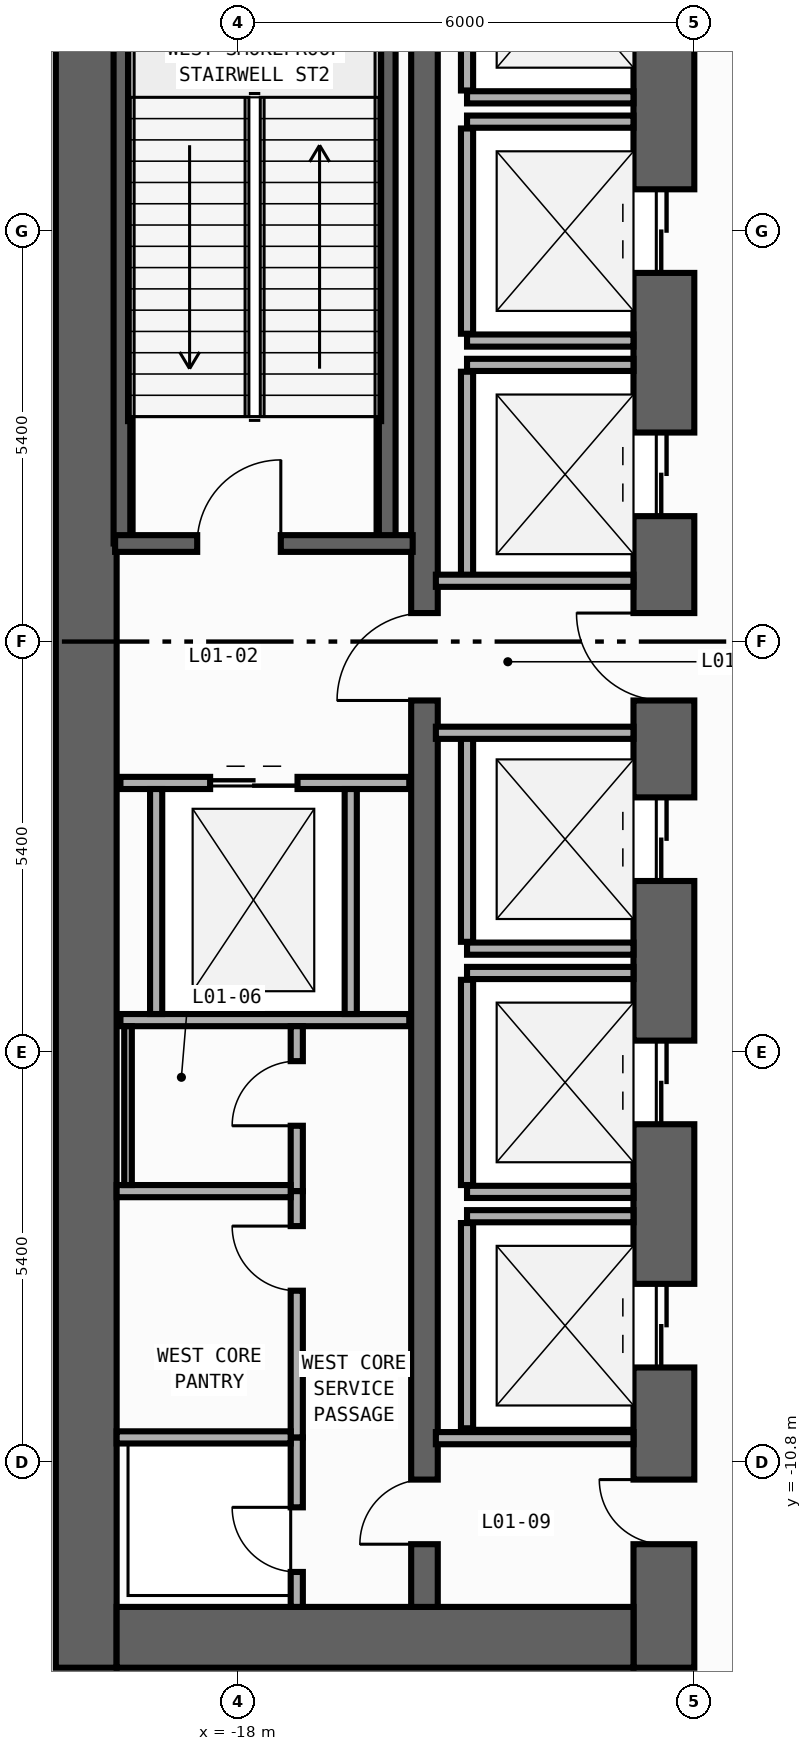
"""IFC4 building model, lengths in metres.
Left out: names, types, materials, properties, quantities, classifications, styles, units other than length and angle.
Written with IfcOpenShell. Run it as: python <this file> out.ifc"""

import sys

from ifc_helpers import new_model, si_unit, direction, frame, frame_2d, origin, place, context, subcontext, project, spatial, rectangle, extrude, element, fill, save


model = new_model("IFC4")
c1 = context("Model", 3, precision=1e-05, world=origin(), true_north=direction((0.0, 1.0)))
c2 = subcontext(c1, "Body", "Model", "MODEL_VIEW")
j1 = project(units=[si_unit("LENGTHUNIT", "METRE"), si_unit("PLANEANGLEUNIT", "RADIAN")], contexts=[c1])
p1 = place(None, origin())
s1 = spatial("IfcSite", under=j1, at=p1, CompositionType="ELEMENT")
p2 = place(p1, origin())
s2 = spatial("IfcBuilding", under=s1, at=p2, CompositionType="ELEMENT")
p3 = place(p2, origin())
s3 = spatial("IfcBuildingStorey", under=s2, at=p3, CompositionType="ELEMENT", Elevation=0.0)
p4 = place(p3, frame((-20.0, -13.5, 0.0), z_axis=(0.0, 0.0, 1.0), x_axis=(0.0, 1.0, 0.0)))
e1 = element("IfcWall", 1, at=p4, inside=s3, PredefinedType="SHEAR", context=c2, shape_type="SweptSolid", body=[
    extrude(rectangle(XDim=27.0, YDim=0.8, at=frame_2d((13.5, 0.0))), origin(), (0.0, 0.0, 1.0), 5.7),
])
p5 = place(p3, frame((-12.4, -13.5, 0.0), z_axis=(0.0, 0.0, 1.0), x_axis=(0.0, 1.0, 0.0)))
e2 = element("IfcWall", 2, at=p5, inside=s3, PredefinedType="SHEAR", context=c2, shape_type="SweptSolid", body=[
    extrude(rectangle(XDim=27.0, YDim=0.8, at=frame_2d((13.5, 0.0))), origin(), (0.0, 0.0, 1.0), 5.7),
])
p6 = place(p5, frame((21.55, 0.0, 0.0)))
e3 = element("IfcOpeningElement", 3, at=p6, cuts=e2, PredefinedType="OPENING", context=c2, shape_type="SweptSolid", body=[
    extrude(rectangle(XDim=1.1, YDim=2.2, at=frame_2d((0.55, 1.1))), frame((0.0, 0.41, 0.0), z_axis=(0.0, -1.0, 0.0), x_axis=(1.0, 0.0, 0.0)), (0.0, 0.0, 1.0), 0.82),
])
p7 = place(p5, frame((18.35, 0.0, 0.0)))
e4 = element("IfcOpeningElement", 4, at=p7, cuts=e2, PredefinedType="OPENING", context=c2, shape_type="SweptSolid", body=[
    extrude(rectangle(XDim=1.1, YDim=2.2, at=frame_2d((0.55, 1.1))), frame((0.0, 0.41, 0.0), z_axis=(0.0, -1.0, 0.0), x_axis=(1.0, 0.0, 0.0)), (0.0, 0.0, 1.0), 0.82),
])
p8 = place(p5, frame((15.15, 0.0, 0.0)))
e5 = element("IfcOpeningElement", 5, at=p8, cuts=e2, PredefinedType="OPENING", context=c2, shape_type="SweptSolid", body=[
    extrude(rectangle(XDim=1.1, YDim=2.2, at=frame_2d((0.55, 1.1))), frame((0.0, 0.41, 0.0), z_axis=(0.0, -1.0, 0.0), x_axis=(1.0, 0.0, 0.0)), (0.0, 0.0, 1.0), 0.82),
])
p9 = place(p5, frame((10.35, 0.0, 0.0)))
e6 = element("IfcOpeningElement", 6, at=p9, cuts=e2, PredefinedType="OPENING", context=c2, shape_type="SweptSolid", body=[
    extrude(rectangle(XDim=1.1, YDim=2.2, at=frame_2d((0.55, 1.1))), frame((0.0, 0.41, 0.0), z_axis=(0.0, -1.0, 0.0), x_axis=(1.0, 0.0, 0.0)), (0.0, 0.0, 1.0), 0.82),
])
p10 = place(p5, frame((7.15, 0.0, 0.0)))
e7 = element("IfcOpeningElement", 7, at=p10, cuts=e2, PredefinedType="OPENING", context=c2, shape_type="SweptSolid", body=[
    extrude(rectangle(XDim=1.1, YDim=2.2, at=frame_2d((0.55, 1.1))), frame((0.0, 0.41, 0.0), z_axis=(0.0, -1.0, 0.0), x_axis=(1.0, 0.0, 0.0)), (0.0, 0.0, 1.0), 0.82),
])
p11 = place(p5, frame((3.95, 0.0, 0.0)))
e8 = element("IfcOpeningElement", 8, at=p11, cuts=e2, PredefinedType="OPENING", context=c2, shape_type="SweptSolid", body=[
    extrude(rectangle(XDim=1.1, YDim=2.2, at=frame_2d((0.55, 1.1))), frame((0.0, 0.41, 0.0), z_axis=(0.0, -1.0, 0.0), x_axis=(1.0, 0.0, 0.0)), (0.0, 0.0, 1.0), 0.82),
])
p12 = place(p5, frame((12.725, 0.0, 0.0)))
e9 = element("IfcOpeningElement", 9, at=p12, cuts=e2, PredefinedType="OPENING", context=c2, shape_type="SweptSolid", body=[
    extrude(rectangle(XDim=1.15, YDim=2.2, at=frame_2d((0.575, 1.1))), frame((0.0, 0.41, 0.0), z_axis=(0.0, -1.0, 0.0), x_axis=(1.0, 0.0, 0.0)), (0.0, 0.0, 1.0), 0.82),
])
p13 = place(p5, frame((1.625, 0.0, 0.0)))
e10 = element("IfcOpeningElement", 10, at=p13, cuts=e2, PredefinedType="OPENING", context=c2, shape_type="SweptSolid", body=[
    extrude(rectangle(XDim=0.85, YDim=2.1, at=frame_2d((0.425, 1.05))), frame((0.0, 0.41, 0.0), z_axis=(0.0, -1.0, 0.0), x_axis=(1.0, 0.0, 0.0)), (0.0, 0.0, 1.0), 0.82),
])
p14 = place(p3, frame((-19.6, -13.1, 0.0), z_axis=(0.0, 0.0, 1.0), x_axis=(1.0, 0.0, 0.0)))
e11 = element("IfcWall", 11, at=p14, inside=s3, PredefinedType="SHEAR", context=c2, shape_type="SweptSolid", body=[
    extrude(rectangle(XDim=6.8, YDim=0.8, at=frame_2d((3.4, 0.0))), origin(), (0.0, 0.0, 1.0), 5.7),
])
p15 = place(p3, frame((-15.55, -12.7, 0.0), z_axis=(0.0, 0.0, 1.0), x_axis=(0.0, 1.0, 0.0)))
e12 = element("IfcWall", 12, at=p15, inside=s3, PredefinedType="SHEAR", context=c2, shape_type="SweptSolid", body=[
    extrude(rectangle(XDim=25.4, YDim=0.35, at=frame_2d((12.7, 0.0))), origin(), (0.0, 0.0, 1.0), 5.7),
])
p16 = place(p15, frame((11.925, 0.0, 0.0)))
e13 = element("IfcOpeningElement", 13, at=p16, cuts=e12, PredefinedType="OPENING", context=c2, shape_type="SweptSolid", body=[
    extrude(rectangle(XDim=1.15, YDim=2.2, at=frame_2d((0.575, 1.1))), frame((0.0, 0.185, 0.0), z_axis=(0.0, -1.0, 0.0), x_axis=(1.0, 0.0, 0.0)), (0.0, 0.0, 1.0), 0.37),
])
p17 = place(p15, frame((0.825, 0.0, 0.0)))
e14 = element("IfcOpeningElement", 14, at=p17, cuts=e12, PredefinedType="OPENING", context=c2, shape_type="SweptSolid", body=[
    extrude(rectangle(XDim=0.85, YDim=2.1, at=frame_2d((0.425, 1.05))), frame((0.0, 0.185, 0.0), z_axis=(0.0, -1.0, 0.0), x_axis=(1.0, 0.0, 0.0)), (0.0, 0.0, 1.0), 0.37),
])
for number, where, z_axis, x_axis in (
    (15, (-16.04, 1.29, 0.0), (0.0, 0.0, 1.0), (0.0, 1.0, 0.0)),
    (16, (-19.53, 1.29, 0.0), (0.0, 0.0, 1.0), (0.0, 1.0, 0.0)),
):
    element("IfcWall", number, at=place(p3, frame(where, z_axis=z_axis, x_axis=x_axis)), inside=s3, PredefinedType="SHEAR", context=c2, shape_type="SweptSolid", body=[
        extrude(rectangle(XDim=11.3, YDim=0.22, at=frame_2d((5.65, 0.0))), origin(), (0.0, 0.0, 1.0), 5.7),
    ])
p18 = place(p3, frame((-19.62, 1.29, 0.0), z_axis=(0.0, 0.0, 1.0), x_axis=(1.0, 0.0, 0.0)))
e17 = element("IfcWall", 17, at=p18, inside=s3, PredefinedType="SHEAR", context=c2, shape_type="SweptSolid", body=[
    extrude(rectangle(XDim=3.915, YDim=0.22, at=frame_2d((1.958, 0.0))), origin(), (0.0, 0.0, 1.0), 5.7),
])
p19 = place(p18, frame((1.08, 0.0, 0.0)))
e18 = element("IfcOpeningElement", 18, at=p19, cuts=e17, PredefinedType="OPENING", context=c2, shape_type="SweptSolid", body=[
    extrude(rectangle(XDim=1.1, YDim=2.2, at=frame_2d((0.55, 1.1))), frame((0.0, 0.12, 0.0), z_axis=(0.0, -1.0, 0.0), x_axis=(1.0, 0.0, 0.0)), (0.0, 0.0, 1.0), 0.24),
])
p20 = place(p3, frame((-14.99, 7.16, 0.0), z_axis=(0.0, 0.0, 1.0), x_axis=(1.0, 0.0, 0.0)))
e19 = element("IfcWall", 19, at=p20, inside=s3, PredefinedType="STANDARD", context=c2, shape_type="SweptSolid", body=[
    extrude(rectangle(XDim=2.19, YDim=0.16, at=frame_2d((1.095, 0.0))), origin(), (0.0, 0.0, 1.0), 5.7),
])
p21 = place(p3, frame((-14.99, 7.25, 0.0), z_axis=(0.0, 0.0, 1.0), x_axis=(0.0, 1.0, 0.0)))
e20 = element("IfcWall", 20, at=p21, inside=s3, PredefinedType="STANDARD", context=c2, shape_type="SweptSolid", body=[
    extrude(rectangle(XDim=2.7, YDim=0.16, at=frame_2d((1.35, 0.0))), origin(), (0.0, 0.0, 1.0), 5.7),
])
for number, where, z_axis, x_axis in (
    (21, (-14.99, 3.96, 0.0), (0.0, 0.0, 1.0), (1.0, 0.0, 0.0)),
    (22, (-14.99, 6.84, 0.0), (0.0, 0.0, 1.0), (1.0, 0.0, 0.0)),
):
    element("IfcWall", number, at=place(p3, frame(where, z_axis=z_axis, x_axis=x_axis)), inside=s3, PredefinedType="STANDARD", context=c2, shape_type="SweptSolid", body=[
        extrude(rectangle(XDim=2.19, YDim=0.16, at=frame_2d((1.095, 0.0))), origin(), (0.0, 0.0, 1.0), 5.7),
    ])
p22 = place(p3, frame((-14.99, 4.05, 0.0), z_axis=(0.0, 0.0, 1.0), x_axis=(0.0, 1.0, 0.0)))
e23 = element("IfcWall", 23, at=p22, inside=s3, PredefinedType="STANDARD", context=c2, shape_type="SweptSolid", body=[
    extrude(rectangle(XDim=2.7, YDim=0.16, at=frame_2d((1.35, 0.0))), origin(), (0.0, 0.0, 1.0), 5.7),
])
p23 = place(p3, frame((-14.99, 3.64, 0.0), z_axis=(0.0, 0.0, 1.0), x_axis=(1.0, 0.0, 0.0)))
e24 = element("IfcWall", 24, at=p23, inside=s3, PredefinedType="STANDARD", context=c2, shape_type="SweptSolid", body=[
    extrude(rectangle(XDim=2.19, YDim=0.16, at=frame_2d((1.095, 0.0))), origin(), (0.0, 0.0, 1.0), 5.7),
])
p24 = place(p3, frame((-14.99, 0.85, 0.0), z_axis=(0.0, 0.0, 1.0), x_axis=(0.0, 1.0, 0.0)))
e25 = element("IfcWall", 25, at=p24, inside=s3, PredefinedType="STANDARD", context=c2, shape_type="SweptSolid", body=[
    extrude(rectangle(XDim=2.7, YDim=0.16, at=frame_2d((1.35, 0.0))), origin(), (0.0, 0.0, 1.0), 5.7),
])
p25 = place(p3, frame((-14.99, -4.04, 0.0), z_axis=(0.0, 0.0, 1.0), x_axis=(1.0, 0.0, 0.0)))
e26 = element("IfcWall", 26, at=p25, inside=s3, PredefinedType="STANDARD", context=c2, shape_type="SweptSolid", body=[
    extrude(rectangle(XDim=2.19, YDim=0.16, at=frame_2d((1.095, 0.0))), origin(), (0.0, 0.0, 1.0), 5.7),
])
p26 = place(p3, frame((-14.99, -3.95, 0.0), z_axis=(0.0, 0.0, 1.0), x_axis=(0.0, 1.0, 0.0)))
e27 = element("IfcWall", 27, at=p26, inside=s3, PredefinedType="STANDARD", context=c2, shape_type="SweptSolid", body=[
    extrude(rectangle(XDim=2.7, YDim=0.16, at=frame_2d((1.35, 0.0))), origin(), (0.0, 0.0, 1.0), 5.7),
])
for number, where, z_axis, x_axis in (
    (28, (-14.99, -7.24, 0.0), (0.0, 0.0, 1.0), (1.0, 0.0, 0.0)),
    (29, (-14.99, -4.36, 0.0), (0.0, 0.0, 1.0), (1.0, 0.0, 0.0)),
):
    element("IfcWall", number, at=place(p3, frame(where, z_axis=z_axis, x_axis=x_axis)), inside=s3, PredefinedType="STANDARD", context=c2, shape_type="SweptSolid", body=[
        extrude(rectangle(XDim=2.19, YDim=0.16, at=frame_2d((1.095, 0.0))), origin(), (0.0, 0.0, 1.0), 5.7),
    ])
p27 = place(p3, frame((-14.99, -7.15, 0.0), z_axis=(0.0, 0.0, 1.0), x_axis=(0.0, 1.0, 0.0)))
e30 = element("IfcWall", 30, at=p27, inside=s3, PredefinedType="STANDARD", context=c2, shape_type="SweptSolid", body=[
    extrude(rectangle(XDim=2.7, YDim=0.16, at=frame_2d((1.35, 0.0))), origin(), (0.0, 0.0, 1.0), 5.7),
])
p28 = place(p3, frame((-14.99, -7.56, 0.0), z_axis=(0.0, 0.0, 1.0), x_axis=(1.0, 0.0, 0.0)))
e31 = element("IfcWall", 31, at=p28, inside=s3, PredefinedType="STANDARD", context=c2, shape_type="SweptSolid", body=[
    extrude(rectangle(XDim=2.19, YDim=0.16, at=frame_2d((1.095, 0.0))), origin(), (0.0, 0.0, 1.0), 5.7),
])
p29 = place(p3, frame((-14.99, -10.35, 0.0), z_axis=(0.0, 0.0, 1.0), x_axis=(0.0, 1.0, 0.0)))
e32 = element("IfcWall", 32, at=p29, inside=s3, PredefinedType="STANDARD", context=c2, shape_type="SweptSolid", body=[
    extrude(rectangle(XDim=2.7, YDim=0.16, at=frame_2d((1.35, 0.0))), origin(), (0.0, 0.0, 1.0), 5.7),
])
p30 = place(p3, frame((-19.55, -1.86, 0.0), z_axis=(0.0, 0.0, 1.0), x_axis=(1.0, 0.0, 0.0)))
e33 = element("IfcWall", 33, at=p30, inside=s3, PredefinedType="STANDARD", context=c2, shape_type="SweptSolid", body=[
    extrude(rectangle(XDim=3.8, YDim=0.16, at=frame_2d((1.9, 0.0))), origin(), (0.0, 0.0, 1.0), 5.7),
])
p31 = place(p30, frame((1.18, 0.0, 0.0)))
e34 = element("IfcOpeningElement", 34, at=p31, cuts=e33, PredefinedType="OPENING", context=c2, shape_type="SweptSolid", body=[
    extrude(rectangle(XDim=1.15, YDim=2.2, at=frame_2d((0.575, 1.1))), frame((0.0, 0.09, 0.0), z_axis=(0.0, -1.0, 0.0), x_axis=(1.0, 0.0, 0.0)), (0.0, 0.0, 1.0), 0.18),
])
p32 = place(p3, frame((-19.55, -4.98, 0.0), z_axis=(0.0, 0.0, 1.0), x_axis=(1.0, 0.0, 0.0)))
e35 = element("IfcWall", 35, at=p32, inside=s3, PredefinedType="STANDARD", context=c2, shape_type="SweptSolid", body=[
    extrude(rectangle(XDim=3.8, YDim=0.16, at=frame_2d((1.9, 0.0))), origin(), (0.0, 0.0, 1.0), 5.7),
])
for number, where, z_axis, x_axis in (
    (36, (-19.08, -4.9, 0.0), (0.0, 0.0, 1.0), (0.0, 1.0, 0.0)),
    (37, (-16.52, -4.9, 0.0), (0.0, 0.0, 1.0), (0.0, 1.0, 0.0)),
):
    element("IfcWall", number, at=place(p3, frame(where, z_axis=z_axis, x_axis=x_axis)), inside=s3, PredefinedType="STANDARD", context=c2, shape_type="SweptSolid", body=[
        extrude(rectangle(XDim=2.96, YDim=0.16, at=frame_2d((1.48, 0.0))), origin(), (0.0, 0.0, 1.0), 5.7),
    ])
for number, where, z_axis, x_axis in (
    (38, (-15.4, 0.8, 0.0), (0.0, 0.0, 1.0), (1.0, 0.0, 0.0)),
    (39, (-15.4, -1.2, 0.0), (0.0, 0.0, 1.0), (1.0, 0.0, 0.0)),
    (40, (-15.4, -10.48, 0.0), (0.0, 0.0, 1.0), (1.0, 0.0, 0.0)),
):
    element("IfcWall", number, at=place(p3, frame(where, z_axis=z_axis, x_axis=x_axis)), inside=s3, PredefinedType="STANDARD", context=c2, shape_type="SweptSolid", body=[
        extrude(rectangle(XDim=2.6, YDim=0.16, at=frame_2d((1.3, 0.0))), origin(), (0.0, 0.0, 1.0), 5.7),
    ])
p33 = place(p3, frame((-17.23, -12.7, 0.0), z_axis=(0.0, 0.0, 1.0), x_axis=(0.0, 1.0, 0.0)))
e41 = element("IfcWall", 41, at=p33, inside=s3, PredefinedType="PARTITIONING", context=c2, shape_type="SweptSolid", body=[
    extrude(rectangle(XDim=2.23, YDim=0.16, at=frame_2d((1.115, 0.0))), origin(), (0.0, 0.0, 1.0), 5.7),
])
p34 = place(p33, frame((0.46, 0.0, 0.0)))
e42 = element("IfcOpeningElement", 42, at=p34, cuts=e41, PredefinedType="OPENING", context=c2, shape_type="SweptSolid", body=[
    extrude(rectangle(XDim=0.85, YDim=2.1, at=frame_2d((0.425, 1.05))), frame((0.0, 0.09, 0.0), z_axis=(0.0, -1.0, 0.0), x_axis=(1.0, 0.0, 0.0)), (0.0, 0.0, 1.0), 0.18),
])
p35 = place(p3, frame((-17.23, -7.23, 0.0), z_axis=(0.0, 0.0, 1.0), x_axis=(0.0, 1.0, 0.0)))
e43 = element("IfcWall", 43, at=p35, inside=s3, PredefinedType="PARTITIONING", context=c2, shape_type="SweptSolid", body=[
    extrude(rectangle(XDim=2.17, YDim=0.16, at=frame_2d((1.085, 0.0))), origin(), (0.0, 0.0, 1.0), 5.7),
])
p36 = place(p35, frame((0.86, 0.0, 0.0)))
e44 = element("IfcOpeningElement", 44, at=p36, cuts=e43, PredefinedType="OPENING", context=c2, shape_type="SweptSolid", body=[
    extrude(rectangle(XDim=0.85, YDim=2.1, at=frame_2d((0.425, 1.05))), frame((0.0, 0.09, 0.0), z_axis=(0.0, -1.0, 0.0), x_axis=(1.0, 0.0, 0.0)), (0.0, 0.0, 1.0), 0.18),
])
p37 = place(p3, frame((-17.23, -10.47, 0.0), z_axis=(0.0, 0.0, 1.0), x_axis=(0.0, 1.0, 0.0)))
e45 = element("IfcWall", 45, at=p37, inside=s3, PredefinedType="PARTITIONING", context=c2, shape_type="SweptSolid", body=[
    extrude(rectangle(XDim=3.24, YDim=0.16, at=frame_2d((1.62, 0.0))), origin(), (0.0, 0.0, 1.0), 5.7),
])
p38 = place(p37, frame((1.93, 0.0, 0.0)))
e46 = element("IfcOpeningElement", 46, at=p38, cuts=e45, PredefinedType="OPENING", context=c2, shape_type="SweptSolid", body=[
    extrude(rectangle(XDim=0.85, YDim=2.1, at=frame_2d((0.425, 1.05))), frame((0.0, 0.09, 0.0), z_axis=(0.0, -1.0, 0.0), x_axis=(1.0, 0.0, 0.0)), (0.0, 0.0, 1.0), 0.18),
])
for number, where, z_axis, x_axis in (
    (47, (-19.6, -10.47, 0.0), (0.0, 0.0, 1.0), (1.0, 0.0, 0.0)),
    (48, (-19.6, -7.23, 0.0), (0.0, 0.0, 1.0), (1.0, 0.0, 0.0)),
):
    element("IfcWall", number, at=place(p3, frame(where, z_axis=z_axis, x_axis=x_axis)), inside=s3, PredefinedType="PARTITIONING", context=c2, shape_type="SweptSolid", body=[
        extrude(rectangle(XDim=2.29, YDim=0.16, at=frame_2d((1.145, 0.0))), origin(), (0.0, 0.0, 1.0), 5.7),
    ])
p39 = place(p3, frame((-19.45, -7.15, 0.0), z_axis=(0.0, 0.0, 1.0), x_axis=(0.0, 1.0, 0.0)))
e49 = element("IfcWall", 49, at=p39, inside=s3, PredefinedType="PARTITIONING", context=c2, shape_type="SweptSolid", body=[
    extrude(rectangle(XDim=2.09, YDim=0.1, at=frame_2d((1.045, 0.0))), origin(), (0.0, 0.0, 1.0), 5.7),
])
p40 = place(p19, origin())
e50 = element("IfcDoor", 50, at=p40, inside=s3, OperationType="SINGLE_SWING_RIGHT", PredefinedType="DOOR", context=c2, shape_type="SweptSolid", body=[
    extrude(rectangle(XDim=1.1, YDim=2.2, at=frame_2d((0.55, 1.1))), frame((0.0, 0.025, 0.0), z_axis=(0.0, -1.0, 0.0), x_axis=(1.0, 0.0, 0.0)), (0.0, 0.0, 1.0), 0.05),
])
fill(e18, e50)
p41 = place(p7, origin())
e51 = element("IfcDoor", 51, at=p41, inside=s3, OperationType="DOUBLE_DOOR_SLIDING", PredefinedType="DOOR", context=c2, shape_type="SweptSolid", body=[
    extrude(rectangle(XDim=1.1, YDim=2.2, at=frame_2d((0.55, 1.1))), frame((0.0, 0.025, 0.0), z_axis=(0.0, -1.0, 0.0), x_axis=(1.0, 0.0, 0.0)), (0.0, 0.0, 1.0), 0.05),
])
fill(e4, e51)
p42 = place(p8, origin())
e52 = element("IfcDoor", 52, at=p42, inside=s3, OperationType="DOUBLE_DOOR_SLIDING", PredefinedType="DOOR", context=c2, shape_type="SweptSolid", body=[
    extrude(rectangle(XDim=1.1, YDim=2.2, at=frame_2d((0.55, 1.1))), frame((0.0, 0.025, 0.0), z_axis=(0.0, -1.0, 0.0), x_axis=(1.0, 0.0, 0.0)), (0.0, 0.0, 1.0), 0.05),
])
fill(e5, e52)
p43 = place(p9, origin())
e53 = element("IfcDoor", 53, at=p43, inside=s3, OperationType="DOUBLE_DOOR_SLIDING", PredefinedType="DOOR", context=c2, shape_type="SweptSolid", body=[
    extrude(rectangle(XDim=1.1, YDim=2.2, at=frame_2d((0.55, 1.1))), frame((0.0, 0.025, 0.0), z_axis=(0.0, -1.0, 0.0), x_axis=(1.0, 0.0, 0.0)), (0.0, 0.0, 1.0), 0.05),
])
fill(e6, e53)
p44 = place(p10, origin())
e54 = element("IfcDoor", 54, at=p44, inside=s3, OperationType="DOUBLE_DOOR_SLIDING", PredefinedType="DOOR", context=c2, shape_type="SweptSolid", body=[
    extrude(rectangle(XDim=1.1, YDim=2.2, at=frame_2d((0.55, 1.1))), frame((0.0, 0.025, 0.0), z_axis=(0.0, -1.0, 0.0), x_axis=(1.0, 0.0, 0.0)), (0.0, 0.0, 1.0), 0.05),
])
fill(e7, e54)
p45 = place(p11, origin())
e55 = element("IfcDoor", 55, at=p45, inside=s3, OperationType="DOUBLE_DOOR_SLIDING", PredefinedType="DOOR", context=c2, shape_type="SweptSolid", body=[
    extrude(rectangle(XDim=1.1, YDim=2.2, at=frame_2d((0.55, 1.1))), frame((0.0, 0.025, 0.0), z_axis=(0.0, -1.0, 0.0), x_axis=(1.0, 0.0, 0.0)), (0.0, 0.0, 1.0), 0.05),
])
fill(e8, e55)
p46 = place(p12, origin())
e56 = element("IfcDoor", 56, at=p46, inside=s3, OperationType="SINGLE_SWING_RIGHT", PredefinedType="DOOR", context=c2, shape_type="SweptSolid", body=[
    extrude(rectangle(XDim=1.15, YDim=2.2, at=frame_2d((0.575, 1.1))), frame((0.0, 0.025, 0.0), z_axis=(0.0, -1.0, 0.0), x_axis=(1.0, 0.0, 0.0)), (0.0, 0.0, 1.0), 0.05),
])
fill(e9, e56)
p47 = place(p16, origin())
e57 = element("IfcDoor", 57, at=p47, inside=s3, OperationType="SINGLE_SWING_LEFT", PredefinedType="DOOR", context=c2, shape_type="SweptSolid", body=[
    extrude(rectangle(XDim=1.15, YDim=2.2, at=frame_2d((0.575, 1.1))), frame((0.0, 0.025, 0.0), z_axis=(0.0, -1.0, 0.0), x_axis=(1.0, 0.0, 0.0)), (0.0, 0.0, 1.0), 0.05),
])
fill(e13, e57)
p48 = place(p13, origin())
e58 = element("IfcDoor", 58, at=p48, inside=s3, OperationType="SINGLE_SWING_RIGHT", PredefinedType="DOOR", context=c2, shape_type="SweptSolid", body=[
    extrude(rectangle(XDim=0.85, YDim=2.1, at=frame_2d((0.425, 1.05))), frame((0.0, 0.025, 0.0), z_axis=(0.0, -1.0, 0.0), x_axis=(1.0, 0.0, 0.0)), (0.0, 0.0, 1.0), 0.05),
])
fill(e10, e58)
p49 = place(p17, origin())
e59 = element("IfcDoor", 59, at=p49, inside=s3, OperationType="SINGLE_SWING_LEFT", PredefinedType="DOOR", context=c2, shape_type="SweptSolid", body=[
    extrude(rectangle(XDim=0.85, YDim=2.1, at=frame_2d((0.425, 1.05))), frame((0.0, 0.025, 0.0), z_axis=(0.0, -1.0, 0.0), x_axis=(1.0, 0.0, 0.0)), (0.0, 0.0, 1.0), 0.05),
])
fill(e14, e59)
p50 = place(p31, origin())
e60 = element("IfcDoor", 60, at=p50, inside=s3, OperationType="DOUBLE_DOOR_SLIDING", PredefinedType="DOOR", context=c2, shape_type="SweptSolid", body=[
    extrude(rectangle(XDim=1.15, YDim=2.2, at=frame_2d((0.575, 1.1))), frame((0.0, 0.025, 0.0), z_axis=(0.0, -1.0, 0.0), x_axis=(1.0, 0.0, 0.0)), (0.0, 0.0, 1.0), 0.05),
])
fill(e34, e60)
p51 = place(p34, origin())
e61 = element("IfcDoor", 61, at=p51, inside=s3, OperationType="SINGLE_SWING_RIGHT", PredefinedType="DOOR", context=c2, shape_type="SweptSolid", body=[
    extrude(rectangle(XDim=0.85, YDim=2.1, at=frame_2d((0.425, 1.05))), frame((0.0, 0.025, 0.0), z_axis=(0.0, -1.0, 0.0), x_axis=(1.0, 0.0, 0.0)), (0.0, 0.0, 1.0), 0.05),
])
fill(e42, e61)
p52 = place(p36, origin())
e62 = element("IfcDoor", 62, at=p52, inside=s3, OperationType="SINGLE_SWING_LEFT", PredefinedType="DOOR", context=c2, shape_type="SweptSolid", body=[
    extrude(rectangle(XDim=0.85, YDim=2.1, at=frame_2d((0.425, 1.05))), frame((0.0, 0.025, 0.0), z_axis=(0.0, -1.0, 0.0), x_axis=(1.0, 0.0, 0.0)), (0.0, 0.0, 1.0), 0.05),
])
fill(e44, e62)
p53 = place(p38, origin())
e63 = element("IfcDoor", 63, at=p53, inside=s3, OperationType="SINGLE_SWING_RIGHT", PredefinedType="DOOR", context=c2, shape_type="SweptSolid", body=[
    extrude(rectangle(XDim=0.85, YDim=2.1, at=frame_2d((0.425, 1.05))), frame((0.0, 0.025, 0.0), z_axis=(0.0, -1.0, 0.0), x_axis=(1.0, 0.0, 0.0)), (0.0, 0.0, 1.0), 0.05),
])
fill(e46, e63)
save(model, sys.argv[1])
